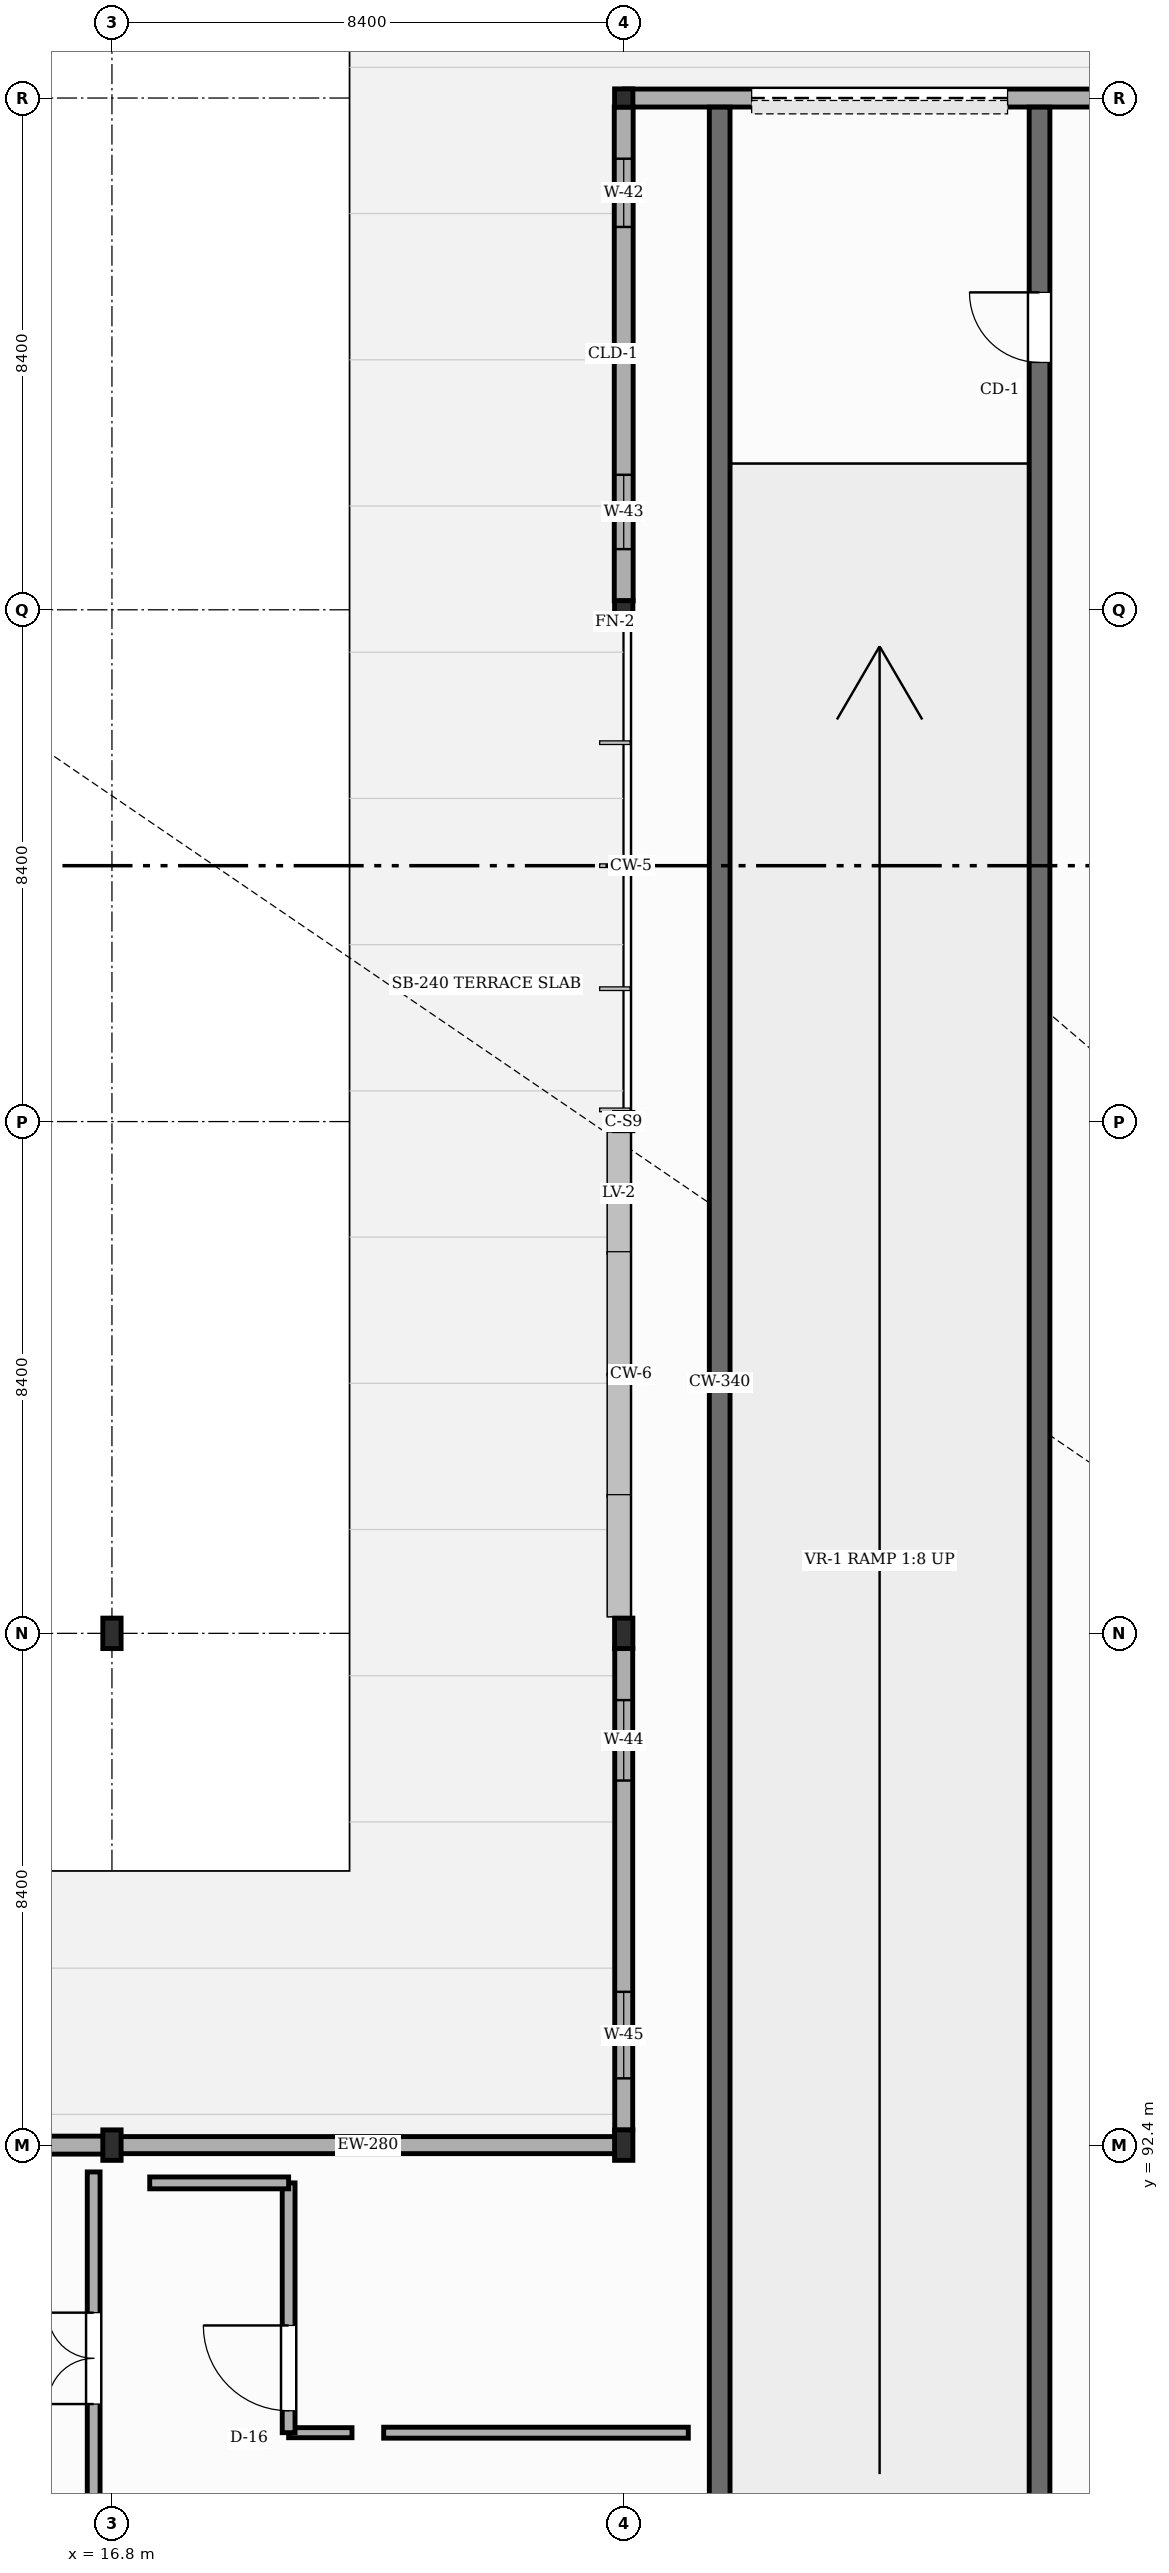
"""IFC4 building model, lengths in metres.
Left out: names, types, materials, properties, quantities, classifications, styles, units other than length and angle.
Written with IfcOpenShell. Run it as: python <this file> out.ifc"""

import sys

from ifc_helpers import new_model, si_unit, direction, frame, frame_2d, origin, origin_2d, place, context, subcontext, project, spatial, rectangle, i_section, extrude, element, fill, save


model = new_model("IFC4")
c1 = context("Model", 3, precision=1e-05, world=origin(), true_north=direction((0.0, 1.0)))
c2 = subcontext(c1, "Body", "Model", "MODEL_VIEW")
j1 = project(units=[si_unit("LENGTHUNIT", "METRE"), si_unit("PLANEANGLEUNIT", "RADIAN")], contexts=[c1])
p1 = place(None, origin())
s1 = spatial("IfcSite", under=j1, at=p1, CompositionType="ELEMENT")
p2 = place(p1, origin())
s2 = spatial("IfcBuilding", under=s1, at=p2, CompositionType="ELEMENT")
p3 = place(p2, origin())
s3 = spatial("IfcBuildingStorey", under=s2, at=p3, CompositionType="ELEMENT", Elevation=0.0)
for number, where, z_axis, x_axis in (
    (1, (16.8, 92.4, 0.0), (0.0, 0.0, 1.0), (1.0, 0.0, 0.0)),
    (2, (16.8, 100.8, 0.0), (0.0, 0.0, 1.0), (1.0, 0.0, 0.0)),
    (3, (25.2, 92.4, 0.0), (0.0, 0.0, 1.0), (1.0, 0.0, 0.0)),
    (4, (25.2, 100.8, 0.0), (0.0, 0.0, 1.0), (1.0, 0.0, 0.0)),
):
    element("IfcColumn", number, at=place(p3, frame(where, z_axis=z_axis, x_axis=x_axis)), inside=s3, PredefinedType="COLUMN", context=c2, shape_type="SweptSolid", body=[
        extrude(i_section(OverallWidth=0.3, OverallDepth=0.5, WebThickness=0.014, FlangeThickness=0.028, FilletRadius=0.027, at=origin_2d()), origin(), (0.0, 0.0, 1.0), 5.4),
    ])
for number, where, z_axis, x_axis in (
    (5, (25.2, 109.2, 0.0), (0.0, 0.0, 1.0), (1.0, 0.0, 0.0)),
    (6, (25.2, 117.6, 0.0), (0.0, 0.0, 1.0), (1.0, 0.0, 0.0)),
    (7, (25.2, 126.0, 0.0), (0.0, 0.0, 1.0), (1.0, 0.0, 0.0)),
):
    element("IfcColumn", number, at=place(p3, frame(where, z_axis=z_axis, x_axis=x_axis)), inside=s3, PredefinedType="COLUMN", context=c2, shape_type="SweptSolid", body=[
        extrude(i_section(OverallWidth=0.3, OverallDepth=0.3, WebThickness=0.011, FlangeThickness=0.019, FilletRadius=0.027, at=origin_2d()), origin(), (0.0, 0.0, 1.0), 5.4),
    ])
p4 = place(p3, frame((33.592, 126.0, 0.0), z_axis=(0.0, 0.0, 1.0), x_axis=(-1.0, 0.0, 0.0)))
e8 = element("IfcWall", 8, at=p4, inside=s3, PredefinedType="STANDARD", context=c2, shape_type="SweptSolid", body=[
    extrude(rectangle(XDim=8.384, YDim=0.295, at=frame_2d((4.192, 0.0))), origin(), (0.0, 0.0, 1.0), 4.797),
])
p5 = place(p4, frame((2.092, 0.0, 0.0)))
e9 = element("IfcOpeningElement", 9, at=p5, cuts=e8, PredefinedType="OPENING", context=c2, shape_type="SweptSolid", body=[
    extrude(rectangle(XDim=4.2, YDim=3.2, at=frame_2d((2.1, 1.6))), frame((0.0, 0.157, 0.0), z_axis=(0.0, -1.0, 0.0), x_axis=(1.0, 0.0, 0.0)), (0.0, 0.0, 1.0), 0.315),
])
p6 = place(p3, frame((25.2, 125.854, 0.0), z_axis=(0.0, 0.0, 1.0), x_axis=(0.0, -1.0, 0.0)))
e10 = element("IfcWall", 10, at=p6, inside=s3, PredefinedType="STANDARD", context=c2, shape_type="SweptSolid", body=[
    extrude(rectangle(XDim=8.108, YDim=0.31, at=frame_2d((4.054, 0.0))), origin(), (0.0, 0.0, 1.0), 4.887),
])
p7 = place(p6, frame((0.85, 0.0, 0.9)))
e11 = element("IfcOpeningElement", 11, at=p7, cuts=e10, PredefinedType="OPENING", context=c2, shape_type="SweptSolid", body=[
    extrude(rectangle(XDim=1.12, YDim=1.85, at=frame_2d((0.56, 0.925))), frame((0.0, 0.165, 0.0), z_axis=(0.0, -1.0, 0.0), x_axis=(1.0, 0.0, 0.0)), (0.0, 0.0, 1.0), 0.33),
])
p8 = place(p6, frame((6.038, 0.0, 0.9)))
e12 = element("IfcOpeningElement", 12, at=p8, cuts=e10, PredefinedType="OPENING", context=c2, shape_type="SweptSolid", body=[
    extrude(rectangle(XDim=1.22, YDim=1.85, at=frame_2d((0.61, 0.925))), frame((0.0, 0.165, 0.0), z_axis=(0.0, -1.0, 0.0), x_axis=(1.0, 0.0, 0.0)), (0.0, 0.0, 1.0), 0.33),
])
p9 = place(p3, frame((25.2, 100.554, 0.0), z_axis=(0.0, 0.0, 1.0), x_axis=(0.0, -1.0, 0.0)))
e13 = element("IfcWall", 13, at=p9, inside=s3, PredefinedType="STANDARD", context=c2, shape_type="SweptSolid", body=[
    extrude(rectangle(XDim=7.908, YDim=0.295, at=frame_2d((3.954, 0.0))), origin(), (0.0, 0.0, 1.0), 4.797),
])
p10 = place(p9, frame((0.85, 0.0, 0.9)))
e14 = element("IfcOpeningElement", 14, at=p10, cuts=e13, PredefinedType="OPENING", context=c2, shape_type="SweptSolid", body=[
    extrude(rectangle(XDim=1.32, YDim=1.85, at=frame_2d((0.66, 0.925))), frame((0.0, 0.157, 0.0), z_axis=(0.0, -1.0, 0.0), x_axis=(1.0, 0.0, 0.0)), (0.0, 0.0, 1.0), 0.315),
])
p11 = place(p9, frame((5.638, 0.0, 0.9)))
e15 = element("IfcOpeningElement", 15, at=p11, cuts=e13, PredefinedType="OPENING", context=c2, shape_type="SweptSolid", body=[
    extrude(rectangle(XDim=1.42, YDim=1.85, at=frame_2d((0.71, 0.925))), frame((0.0, 0.157, 0.0), z_axis=(0.0, -1.0, 0.0), x_axis=(1.0, 0.0, 0.0)), (0.0, 0.0, 1.0), 0.315),
])
p12 = place(p3, frame((25.192, 92.4, 0.0), z_axis=(0.0, 0.0, 1.0), x_axis=(-1.0, 0.0, 0.0)))
e16 = element("IfcWall", 16, at=p12, inside=s3, PredefinedType="STANDARD", context=c2, shape_type="SweptSolid", body=[
    extrude(rectangle(XDim=8.384, YDim=0.28, at=frame_2d((4.192, 0.0))), origin(), (0.0, 0.0, 1.0), 4.827),
])
p13 = place(p3, frame((8.408, 92.4, 0.0), z_axis=(0.0, 0.0, 1.0), x_axis=(1.0, 0.0, 0.0)))
e17 = element("IfcWall", 17, at=p13, inside=s3, PredefinedType="STANDARD", context=c2, shape_type="SweptSolid", body=[
    extrude(rectangle(XDim=8.384, YDim=0.295, at=frame_2d((4.192, 0.0))), origin(), (0.0, 0.0, 1.0), 4.797),
])
p14 = place(p13, frame((3.892, 0.0, 0.0)))
e18 = element("IfcOpeningElement", 18, at=p14, cuts=e17, PredefinedType="OPENING", context=c2, shape_type="SweptSolid", body=[
    extrude(rectangle(XDim=2.9, YDim=2.38, at=frame_2d((1.45, 1.19))), frame((0.0, 0.157, 0.0), z_axis=(0.0, -1.0, 0.0), x_axis=(1.0, 0.0, 0.0)), (0.0, 0.0, 1.0), 0.315),
])
p15 = place(p3, frame((16.5, 85.84, 0.0), z_axis=(0.0, 0.0, 1.0), x_axis=(0.0, 1.0, 0.0)))
e19 = element("IfcWall", 19, at=p15, inside=s3, PredefinedType="STANDARD", context=c2, shape_type="SweptSolid", body=[
    extrude(rectangle(XDim=6.12, YDim=0.21, at=frame_2d((3.06, 0.0))), origin(), (0.0, 0.0, 1.0), 4.847),
])
p16 = place(p15, frame((2.31, 0.0, 0.0)))
e20 = element("IfcOpeningElement", 20, at=p16, cuts=e19, PredefinedType="OPENING", context=c2, shape_type="SweptSolid", body=[
    extrude(rectangle(XDim=1.5, YDim=2.2, at=frame_2d((0.75, 1.1))), frame((0.0, 0.115, 0.0), z_axis=(0.0, -1.0, 0.0), x_axis=(1.0, 0.0, 0.0)), (0.0, 0.0, 1.0), 0.23),
])
p17 = place(p3, frame((26.775, 83.66, 0.0), z_axis=(0.0, 0.0, 1.0), x_axis=(0.0, 1.0, 0.0)))
e21 = element("IfcWall", 21, at=p17, inside=s3, PredefinedType="SHEAR", context=c2, shape_type="SweptSolid", body=[
    extrude(rectangle(XDim=42.19, YDim=0.34, at=frame_2d((21.095, 0.0))), origin(), (0.0, 0.0, 1.0), 5.175),
])
p18 = place(p3, frame((32.025, 83.66, 0.0), z_axis=(0.0, 0.0, 1.0), x_axis=(0.0, 1.0, 0.0)))
e22 = element("IfcWall", 22, at=p18, inside=s3, PredefinedType="SHEAR", context=c2, shape_type="SweptSolid", body=[
    extrude(rectangle(XDim=42.19, YDim=0.34, at=frame_2d((21.095, 0.0))), origin(), (0.0, 0.0, 1.0), 5.175),
])
p19 = place(p18, frame((38.0, 0.0, 0.0)))
e23 = element("IfcOpeningElement", 23, at=p19, cuts=e22, PredefinedType="OPENING", context=c2, shape_type="SweptSolid", body=[
    extrude(rectangle(XDim=1.15, YDim=2.15, at=frame_2d((0.575, 1.075))), frame((0.0, 0.18, 0.0), z_axis=(0.0, -1.0, 0.0), x_axis=(1.0, 0.0, 0.0)), (0.0, 0.0, 1.0), 0.36),
])
p20 = place(p3, frame((26.26, 87.68, -0.004), z_axis=(0.0, 0.0, 1.0), x_axis=(-1.0, 0.0, 0.0)))
e24 = element("IfcWall", 24, at=p20, inside=s3, PredefinedType="STANDARD", context=c2, shape_type="SweptSolid", body=[
    extrude(rectangle(XDim=5.0, YDim=0.18, at=frame_2d((2.5, 0.0))), origin(), (0.0, 0.0, 1.0), 5.179),
])
p21 = place(p3, frame((20.74, 87.68, -0.004), z_axis=(0.0, 0.0, 1.0), x_axis=(-1.0, 0.0, 0.0)))
e25 = element("IfcWall", 25, at=p21, inside=s3, PredefinedType="STANDARD", context=c2, shape_type="SweptSolid", body=[
    extrude(rectangle(XDim=1.04, YDim=0.165, at=frame_2d((0.52, 0.0))), origin(), (0.0, 0.0, 1.0), 5.179),
])
p22 = place(p3, frame((19.7, 87.68, -0.004), z_axis=(0.0, 0.0, 1.0), x_axis=(0.0, 1.0, 0.0)))
e26 = element("IfcWall", 26, at=p22, inside=s3, PredefinedType="STANDARD", context=c2, shape_type="SweptSolid", body=[
    extrude(rectangle(XDim=4.1, YDim=0.21, at=frame_2d((2.05, 0.0))), origin(), (0.0, 0.0, 1.0), 4.921),
])
p23 = place(p22, frame((0.36, 0.0, 0.0)))
e27 = element("IfcOpeningElement", 27, at=p23, cuts=e26, PredefinedType="OPENING", context=c2, shape_type="SweptSolid", body=[
    extrude(rectangle(XDim=1.4, YDim=2.14, at=frame_2d((0.7, 1.07))), frame((0.0, 0.115, 0.0), z_axis=(0.0, -1.0, 0.0), x_axis=(1.0, 0.0, 0.0)), (0.0, 0.0, 1.0), 0.23),
])
p24 = place(p3, frame((19.7, 91.78, -0.004), z_axis=(0.0, 0.0, 1.0), x_axis=(-1.0, 0.0, 0.0)))
e28 = element("IfcWall", 28, at=p24, inside=s3, PredefinedType="STANDARD", context=c2, shape_type="SweptSolid", body=[
    extrude(rectangle(XDim=2.28, YDim=0.195, at=frame_2d((1.14, 0.0))), origin(), (0.0, 0.0, 1.0), 5.179),
])
p25 = place(p5, origin())
e29 = element("IfcDoor", 29, at=p25, inside=s3, OperationType="ROLLINGUP", PredefinedType="GATE", context=c2, shape_type="SweptSolid", body=[
    extrude(rectangle(XDim=4.2, YDim=3.2, at=frame_2d((2.1, 1.6))), frame((0.0, 0.025, 0.0), z_axis=(0.0, -1.0, 0.0), x_axis=(1.0, 0.0, 0.0)), (0.0, 0.0, 1.0), 0.05),
])
fill(e9, e29)
p26 = place(p7, origin())
e30 = element("IfcWindow", 30, at=p26, inside=s3, PartitioningType="SINGLE_PANEL", PredefinedType="WINDOW", context=c2, shape_type="SweptSolid", body=[
    extrude(rectangle(XDim=1.12, YDim=1.85, at=frame_2d((0.56, 0.925))), frame((0.0, 0.03, 0.0), z_axis=(0.0, -1.0, 0.0), x_axis=(1.0, 0.0, 0.0)), (0.0, 0.0, 1.0), 0.06),
])
fill(e11, e30)
p27 = place(p8, origin())
e31 = element("IfcWindow", 31, at=p27, inside=s3, PartitioningType="SINGLE_PANEL", PredefinedType="WINDOW", context=c2, shape_type="SweptSolid", body=[
    extrude(rectangle(XDim=1.22, YDim=1.85, at=frame_2d((0.61, 0.925))), frame((0.0, 0.03, 0.0), z_axis=(0.0, -1.0, 0.0), x_axis=(1.0, 0.0, 0.0)), (0.0, 0.0, 1.0), 0.06),
])
fill(e12, e31)
p28 = place(p10, origin())
e32 = element("IfcWindow", 32, at=p28, inside=s3, PartitioningType="SINGLE_PANEL", PredefinedType="WINDOW", context=c2, shape_type="SweptSolid", body=[
    extrude(rectangle(XDim=1.32, YDim=1.85, at=frame_2d((0.66, 0.925))), frame((0.0, 0.03, 0.0), z_axis=(0.0, -1.0, 0.0), x_axis=(1.0, 0.0, 0.0)), (0.0, 0.0, 1.0), 0.06),
])
fill(e14, e32)
p29 = place(p11, origin())
e33 = element("IfcWindow", 33, at=p29, inside=s3, PartitioningType="SINGLE_PANEL", PredefinedType="WINDOW", context=c2, shape_type="SweptSolid", body=[
    extrude(rectangle(XDim=1.42, YDim=1.85, at=frame_2d((0.71, 0.925))), frame((0.0, 0.03, 0.0), z_axis=(0.0, -1.0, 0.0), x_axis=(1.0, 0.0, 0.0)), (0.0, 0.0, 1.0), 0.06),
])
fill(e15, e33)
p30 = place(p16, origin())
e34 = element("IfcDoor", 34, at=p30, inside=s3, OperationType="DOUBLE_DOOR_SINGLE_SWING", PredefinedType="DOOR", context=c2, shape_type="SweptSolid", body=[
    extrude(rectangle(XDim=1.5, YDim=2.2, at=frame_2d((0.75, 1.1))), frame((0.0, 0.025, 0.0), z_axis=(0.0, -1.0, 0.0), x_axis=(1.0, 0.0, 0.0)), (0.0, 0.0, 1.0), 0.05),
])
fill(e20, e34)
p31 = place(p19, origin())
e35 = element("IfcDoor", 35, at=p31, inside=s3, OperationType="SINGLE_SWING_RIGHT", PredefinedType="DOOR", context=c2, shape_type="SweptSolid", body=[
    extrude(rectangle(XDim=1.15, YDim=2.15, at=frame_2d((0.575, 1.075))), frame((0.0, 0.025, 0.0), z_axis=(0.0, -1.0, 0.0), x_axis=(1.0, 0.0, 0.0)), (0.0, 0.0, 1.0), 0.05),
])
fill(e23, e35)
p32 = place(p23, origin())
e36 = element("IfcDoor", 36, at=p32, inside=s3, OperationType="SINGLE_SWING_RIGHT", PredefinedType="DOOR", context=c2, shape_type="SweptSolid", body=[
    extrude(rectangle(XDim=1.4, YDim=2.14, at=frame_2d((0.7, 1.07))), frame((0.0, 0.025, 0.0), z_axis=(0.0, -1.0, 0.0), x_axis=(1.0, 0.0, 0.0)), (0.0, 0.0, 1.0), 0.05),
])
fill(e27, e36)
save(model, sys.argv[1])
